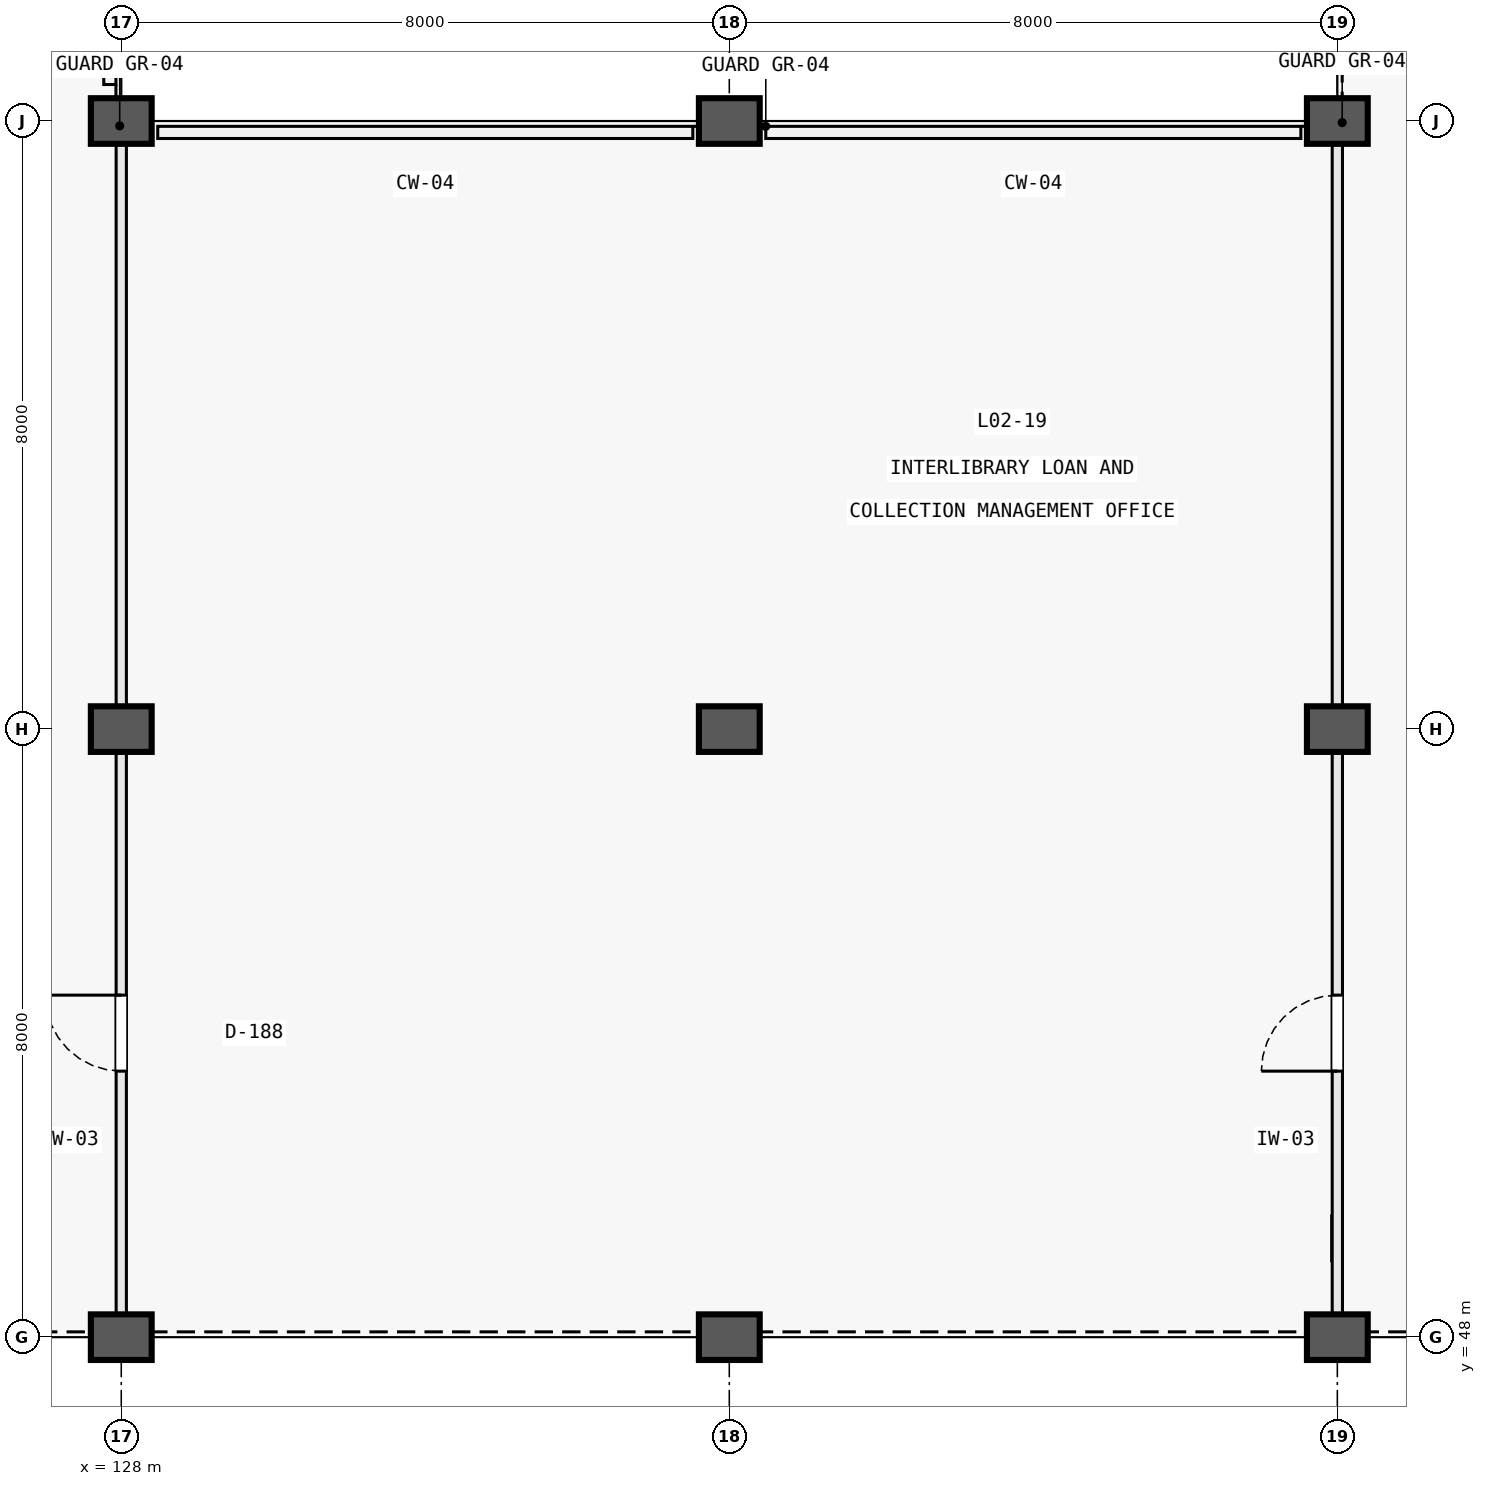
"""IFC4 building model, lengths in metres.
Left out: names, types, materials, properties, quantities, classifications, styles, units other than length and angle.
Written with IfcOpenShell. Run it as: python <this file> out.ifc"""

import sys

from ifc_helpers import new_model, si_unit, direction, frame, frame_2d, origin, origin_2d, place, context, subcontext, project, spatial, rectangle, extrude, element, fill, save


model = new_model("IFC4")
c1 = context("Model", 3, precision=1e-05, world=origin(), true_north=direction((0.0, 1.0)))
c2 = subcontext(c1, "Body", "Model", "MODEL_VIEW")
j1 = project(units=[si_unit("LENGTHUNIT", "METRE"), si_unit("PLANEANGLEUNIT", "RADIAN")], contexts=[c1])
p1 = place(None, origin())
s1 = spatial("IfcSite", under=j1, at=p1, CompositionType="ELEMENT")
p2 = place(p1, origin())
s2 = spatial("IfcBuilding", under=s1, at=p2, CompositionType="ELEMENT")
p3 = place(p2, frame((0.0, 0.0, 5.4)))
s3 = spatial("IfcBuildingStorey", under=s2, at=p3, CompositionType="ELEMENT", Elevation=5.4)
for number, where, z_axis, x_axis in (
    (1, (128.0, 48.0, 0.0), (0.0, 0.0, 1.0), (1.0, 0.0, 0.0)),
    (2, (128.0, 56.0, 0.0), (0.0, 0.0, 1.0), (1.0, 0.0, 0.0)),
    (3, (128.0, 64.0, 0.0), (0.0, 0.0, 1.0), (1.0, 0.0, 0.0)),
    (4, (136.0, 48.0, 0.0), (0.0, 0.0, 1.0), (1.0, 0.0, 0.0)),
    (5, (136.0, 56.0, 0.0), (0.0, 0.0, 1.0), (1.0, 0.0, 0.0)),
    (6, (136.0, 64.0, 0.0), (0.0, 0.0, 1.0), (1.0, 0.0, 0.0)),
    (7, (144.0, 48.0, 0.0), (0.0, 0.0, 1.0), (1.0, 0.0, 0.0)),
    (8, (144.0, 56.0, 0.0), (0.0, 0.0, 1.0), (1.0, 0.0, 0.0)),
    (9, (144.0, 64.0, 0.0), (0.0, 0.0, 1.0), (1.0, 0.0, 0.0)),
):
    element("IfcColumn", number, at=place(p3, frame(where, z_axis=z_axis, x_axis=x_axis)), inside=s3, PredefinedType="COLUMN", context=c2, shape_type="SweptSolid", body=[
        extrude(rectangle(XDim=0.8, YDim=0.6, at=origin_2d()), origin(), (0.0, 0.0, 1.0), 5.1),
    ])
p4 = place(p3, frame((144.0, 48.31, 0.0), z_axis=(0.0, 0.0, 1.0), x_axis=(0.0, 1.0, 0.0)))
e10 = element("IfcWall", 10, at=p4, inside=s3, PredefinedType="PARTITIONING", context=c2, shape_type="SweptSolid", body=[
    extrude(rectangle(XDim=7.38, YDim=0.135, at=frame_2d((3.69, 0.0))), origin(), (0.0, 0.0, 1.0), 3.61),
])
p5 = place(p4, frame((3.19, 0.0, 0.0)))
e11 = element("IfcOpeningElement", 11, at=p5, cuts=e10, PredefinedType="OPENING", context=c2, shape_type="SweptSolid", body=[
    extrude(rectangle(XDim=1.0, YDim=2.15, at=frame_2d((0.5, 1.075))), frame((0.0, 0.08, 0.0), z_axis=(0.0, -1.0, 0.0), x_axis=(1.0, 0.0, 0.0)), (0.0, 0.0, 1.0), 0.159),
])
p6 = place(p3, frame((144.0, 56.31, 0.0), z_axis=(0.0, 0.0, 1.0), x_axis=(0.0, 1.0, 0.0)))
e12 = element("IfcWall", 12, at=p6, inside=s3, PredefinedType="PARTITIONING", context=c2, shape_type="SweptSolid", body=[
    extrude(rectangle(XDim=7.38, YDim=0.135, at=frame_2d((3.69, 0.0))), origin(), (0.0, 0.0, 1.0), 3.61),
])
p7 = place(p3, frame((128.0, 48.31, 0.0), z_axis=(0.0, 0.0, 1.0), x_axis=(0.0, 1.0, 0.0)))
e13 = element("IfcWall", 13, at=p7, inside=s3, PredefinedType="PARTITIONING", context=c2, shape_type="SweptSolid", body=[
    extrude(rectangle(XDim=7.38, YDim=0.135, at=frame_2d((3.69, 0.0))), origin(), (0.0, 0.0, 1.0), 3.61),
])
p8 = place(p7, frame((3.19, 0.0, 0.0)))
e14 = element("IfcOpeningElement", 14, at=p8, cuts=e13, PredefinedType="OPENING", context=c2, shape_type="SweptSolid", body=[
    extrude(rectangle(XDim=1.0, YDim=2.15, at=frame_2d((0.5, 1.075))), frame((0.0, 0.08, 0.0), z_axis=(0.0, -1.0, 0.0), x_axis=(1.0, 0.0, 0.0)), (0.0, 0.0, 1.0), 0.159),
])
p9 = place(p3, frame((128.0, 56.31, 0.0), z_axis=(0.0, 0.0, 1.0), x_axis=(0.0, 1.0, 0.0)))
e15 = element("IfcWall", 15, at=p9, inside=s3, PredefinedType="PARTITIONING", context=c2, shape_type="SweptSolid", body=[
    extrude(rectangle(XDim=7.38, YDim=0.135, at=frame_2d((3.69, 0.0))), origin(), (0.0, 0.0, 1.0), 3.61),
])
p10 = place(p5, origin())
e16 = element("IfcDoor", 16, at=p10, inside=s3, OperationType="SINGLE_SWING_LEFT", PredefinedType="DOOR", context=c2, shape_type="SweptSolid", body=[
    extrude(rectangle(XDim=1.0, YDim=2.15, at=frame_2d((0.5, 1.075))), frame((0.0, 0.025, 0.0), z_axis=(0.0, -1.0, 0.0), x_axis=(1.0, 0.0, 0.0)), (0.0, 0.0, 1.0), 0.05),
])
fill(e11, e16)
p11 = place(p8, origin())
e17 = element("IfcDoor", 17, at=p11, inside=s3, OperationType="SINGLE_SWING_RIGHT", PredefinedType="DOOR", context=c2, shape_type="SweptSolid", body=[
    extrude(rectangle(XDim=1.0, YDim=2.15, at=frame_2d((0.5, 1.075))), frame((0.0, 0.025, 0.0), z_axis=(0.0, -1.0, 0.0), x_axis=(1.0, 0.0, 0.0)), (0.0, 0.0, 1.0), 0.05),
])
fill(e14, e17)
save(model, sys.argv[1])
